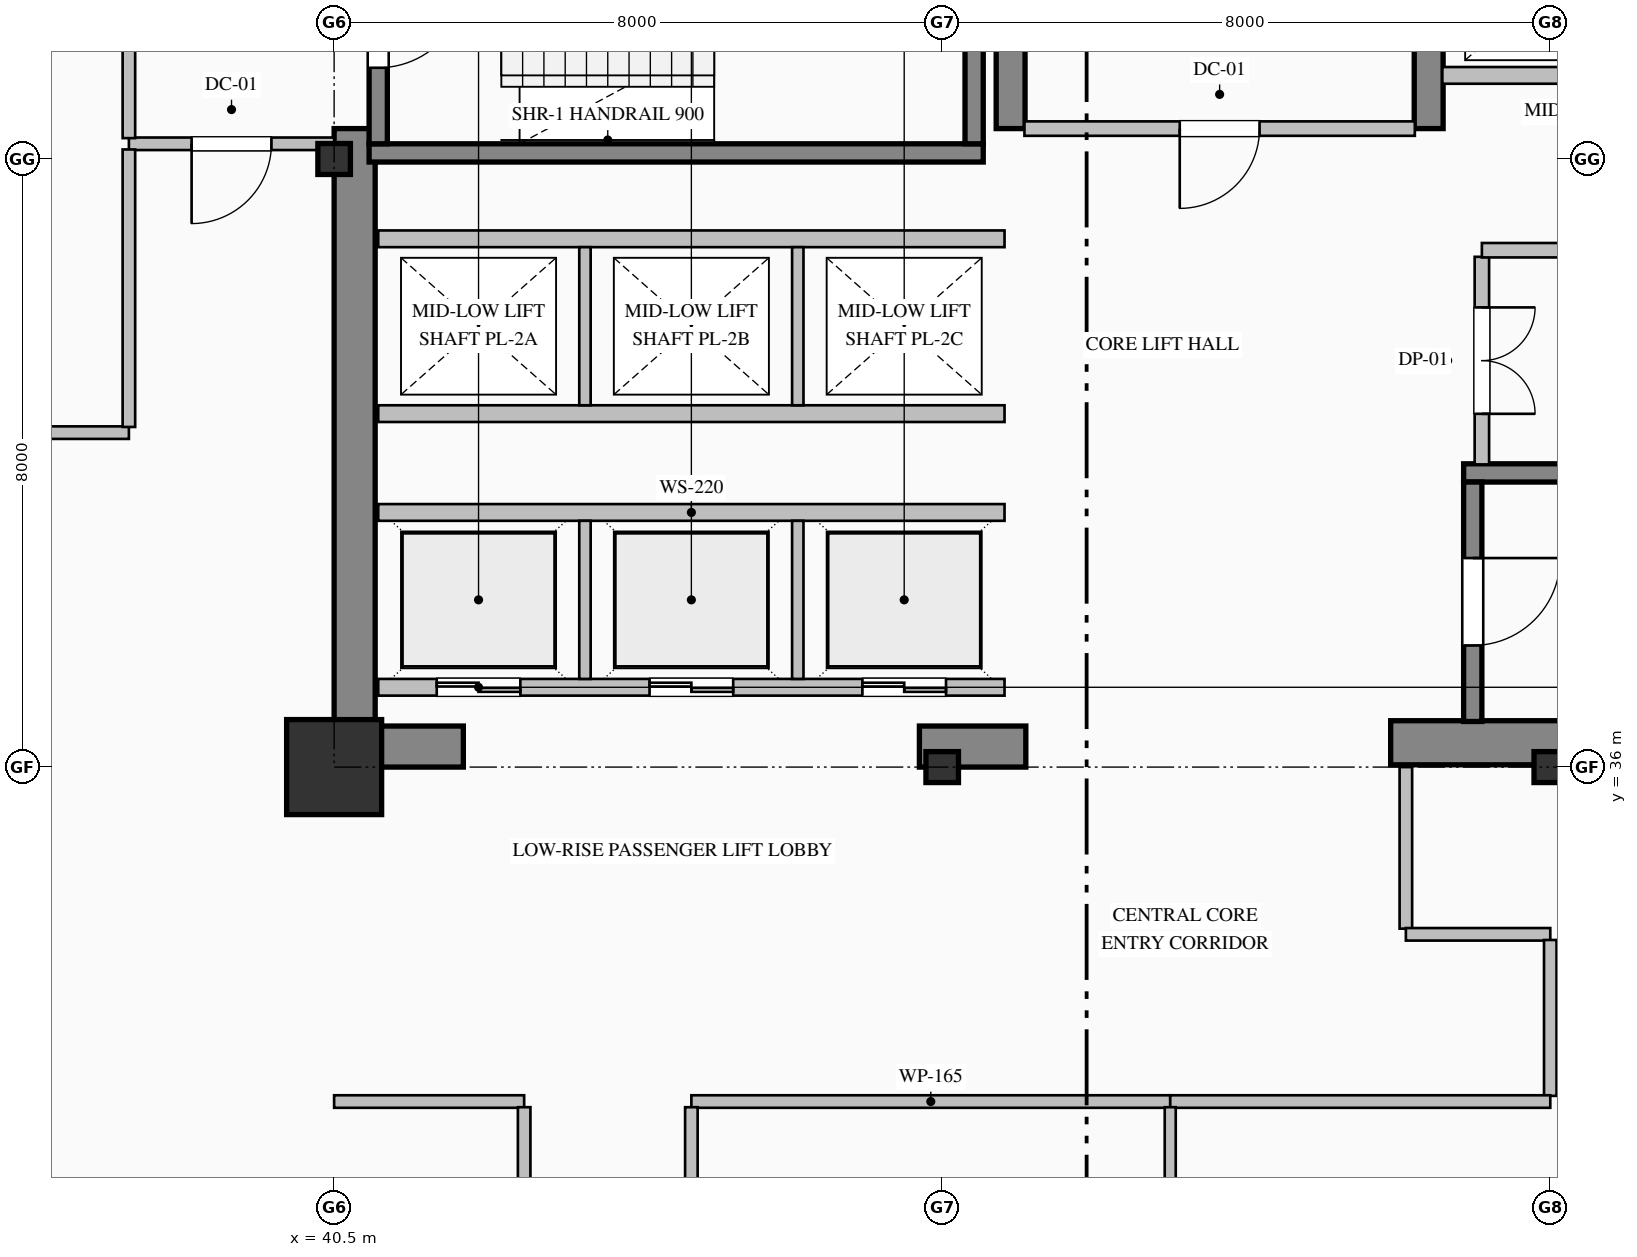
"""IFC4 building model, lengths in metres.
Left out: names, types, materials, properties, quantities, classifications, styles, units other than length and angle.
Written with IfcOpenShell. Run it as: python <this file> out.ifc"""

import sys

from ifc_helpers import new_model, si_unit, direction, frame, frame_2d, origin, origin_2d, place, context, subcontext, project, spatial, rectangle, hollow_rectangle, i_section, extrude, element, fill, save


model = new_model("IFC4")
c1 = context("Model", 3, precision=1e-05, world=origin(), true_north=direction((0.0, 1.0)))
c2 = subcontext(c1, "Body", "Model", "MODEL_VIEW")
j1 = project(units=[si_unit("LENGTHUNIT", "METRE"), si_unit("PLANEANGLEUNIT", "RADIAN")], contexts=[c1])
p1 = place(None, origin())
s1 = spatial("IfcSite", under=j1, at=p1, CompositionType="ELEMENT")
p2 = place(p1, origin())
s2 = spatial("IfcBuilding", under=s1, at=p2, CompositionType="ELEMENT")
p3 = place(p2, frame((0.0, 0.0, 76.2)))
s3 = spatial("IfcBuildingStorey", under=s2, at=p3, CompositionType="ELEMENT", Elevation=76.2)
p4 = place(p3, frame((40.77, 36.54, 0.0), z_axis=(0.0, 0.0, 1.0), x_axis=(0.0, 1.0, 0.0)))
e1 = element("IfcWall", 1, at=p4, inside=s3, PredefinedType="SHEAR", context=c2, shape_type="SweptSolid", body=[
    extrude(rectangle(XDim=7.86, YDim=0.54, at=frame_2d((3.93, 0.0))), origin(), (0.0, 0.0, 1.0), 3.75),
])
p5 = place(p3, frame((40.5, 36.27, 0.0), z_axis=(0.0, 0.0, 1.0), x_axis=(1.0, 0.0, 0.0)))
e2 = element("IfcWall", 2, at=p5, inside=s3, PredefinedType="SHEAR", context=c2, shape_type="SweptSolid", body=[
    extrude(rectangle(XDim=1.7, YDim=0.54, at=frame_2d((0.85, 0.0))), origin(), (0.0, 0.0, 1.0), 3.75),
])
p6 = place(p3, frame((48.2, 36.27, 0.0), z_axis=(0.0, 0.0, 1.0), x_axis=(1.0, 0.0, 0.0)))
e3 = element("IfcWall", 3, at=p6, inside=s3, PredefinedType="SHEAR", context=c2, shape_type="SweptSolid", body=[
    extrude(rectangle(XDim=1.4, YDim=0.54, at=frame_2d((0.7, 0.0))), origin(), (0.0, 0.0, 1.0), 3.75),
])
p7 = place(p3, frame((54.4, 36.32, 0.0), z_axis=(0.0, 0.0, 1.0), x_axis=(1.0, 0.0, 0.0)))
e4 = element("IfcWall", 4, at=p7, inside=s3, PredefinedType="SHEAR", context=c2, shape_type="SweptSolid", body=[
    extrude(rectangle(XDim=9.6, YDim=0.58, at=frame_2d((4.8, 0.0))), origin(), (0.0, 0.0, 1.0), 4.0),
])
p8 = place(p3, frame((49.4, 44.4, 0.0), z_axis=(0.0, 0.0, 1.0), x_axis=(0.0, 1.0, 0.0)))
e5 = element("IfcWall", 5, at=p8, inside=s3, PredefinedType="SHEAR", context=c2, shape_type="SweptSolid", body=[
    extrude(rectangle(XDim=3.0, YDim=0.38, at=frame_2d((1.5, 0.0))), origin(), (0.0, 0.0, 1.0), 3.75),
])
p9 = place(p3, frame((54.9, 44.4, 0.0), z_axis=(0.0, 0.0, 1.0), x_axis=(0.0, 1.0, 0.0)))
e6 = element("IfcWall", 6, at=p9, inside=s3, PredefinedType="SHEAR", context=c2, shape_type="SweptSolid", body=[
    extrude(rectangle(XDim=7.06, YDim=0.38, at=frame_2d((3.53, 0.0))), origin(), (0.0, 0.0, 1.0), 3.75),
])
p10 = place(p3, frame((40.5, 36.0, 0.0), z_axis=(0.0, 0.0, 1.0), x_axis=(1.0, 0.0, 0.0)))
e7 = element("IfcColumn", 7, at=p10, inside=s3, PredefinedType="COLUMN", context=c2, shape_type="SweptSolid", body=[
    extrude(hollow_rectangle(XDim=1.25, YDim=1.25, WallThickness=0.045, at=origin_2d()), origin(), (0.0, 0.0, 1.0), 4.0),
])
for number, where, z_axis, x_axis in (
    (8, (40.5, 44.0, 0.0), (0.0, 0.0, 1.0), (1.0, 0.0, 0.0)),
    (9, (48.5, 36.0, 0.0), (0.0, 0.0, 1.0), (1.0, 0.0, 0.0)),
    (10, (56.5, 36.0, 0.0), (0.0, 0.0, 1.0), (1.0, 0.0, 0.0)),
):
    element("IfcColumn", number, at=place(p3, frame(where, z_axis=z_axis, x_axis=x_axis)), inside=s3, PredefinedType="COLUMN", context=c2, shape_type="SweptSolid", body=[
        extrude(i_section(OverallWidth=0.407, OverallDepth=0.428, WebThickness=0.02, FlangeThickness=0.035, FilletRadius=0.022, at=origin_2d()), origin(), (0.0, 0.0, 1.0), 4.0),
    ])
p11 = place(p3, frame((49.04, 44.08, 0.0), z_axis=(0.0, 0.0, 1.0), x_axis=(-1.0, 0.0, 0.0)))
e11 = element("IfcWall", 11, at=p11, inside=s3, PredefinedType="SOLIDWALL", context=c2, shape_type="SweptSolid", body=[
    extrude(rectangle(XDim=8.08, YDim=0.24, at=frame_2d((4.04, 0.0))), origin(), (0.0, 0.0, 1.0), 4.0),
])
p12 = place(p3, frame((41.08, 47.35, 0.0), z_axis=(0.0, 0.0, 1.0), x_axis=(0.0, -1.0, 0.0)))
e12 = element("IfcWall", 12, at=p12, inside=s3, PredefinedType="SOLIDWALL", context=c2, shape_type="SweptSolid", body=[
    extrude(rectangle(XDim=3.15, YDim=0.24, at=frame_2d((1.575, 0.0))), origin(), (0.0, 0.0, 1.0), 4.0),
])
p13 = place(p12, frame((1.0, 0.0, 0.0)))
e13 = element("IfcOpeningElement", 13, at=p13, cuts=e12, PredefinedType="OPENING", context=c2, shape_type="SweptSolid", body=[
    extrude(rectangle(XDim=1.15, YDim=2.2, at=frame_2d((0.575, 1.1))), frame((0.0, 0.13, 0.0), z_axis=(0.0, -1.0, 0.0), x_axis=(1.0, 0.0, 0.0)), (0.0, 0.0, 1.0), 0.26),
])
p14 = place(p3, frame((48.92, 44.2, 0.0), z_axis=(0.0, 0.0, 1.0), x_axis=(0.0, 1.0, 0.0)))
e14 = element("IfcWall", 14, at=p14, inside=s3, PredefinedType="SOLIDWALL", context=c2, shape_type="SweptSolid", body=[
    extrude(rectangle(XDim=3.15, YDim=0.24, at=frame_2d((1.575, 0.0))), origin(), (0.0, 0.0, 1.0), 4.0),
])
p15 = place(p3, frame((55.36, 39.87, 0.0), z_axis=(0.0, 0.0, 1.0), x_axis=(1.0, 0.0, 0.0)))
e15 = element("IfcWall", 15, at=p15, inside=s3, PredefinedType="SOLIDWALL", context=c2, shape_type="SweptSolid", body=[
    extrude(rectangle(XDim=8.08, YDim=0.24, at=frame_2d((4.04, 0.0))), origin(), (0.0, 0.0, 1.0), 4.0),
])
p16 = place(p3, frame((55.48, 39.75, 0.0), z_axis=(0.0, 0.0, 1.0), x_axis=(0.0, -1.0, 0.0)))
e16 = element("IfcWall", 16, at=p16, inside=s3, PredefinedType="SOLIDWALL", context=c2, shape_type="SweptSolid", body=[
    extrude(rectangle(XDim=3.15, YDim=0.24, at=frame_2d((1.575, 0.0))), origin(), (0.0, 0.0, 1.0), 4.0),
])
p17 = place(p16, frame((1.0, 0.0, 0.0)))
e17 = element("IfcOpeningElement", 17, at=p17, cuts=e16, PredefinedType="OPENING", context=c2, shape_type="SweptSolid", body=[
    extrude(rectangle(XDim=1.15, YDim=2.2, at=frame_2d((0.575, 1.1))), frame((0.0, 0.13, 0.0), z_axis=(0.0, -1.0, 0.0), x_axis=(1.0, 0.0, 0.0)), (0.0, 0.0, 1.0), 0.26),
])
p18 = place(p3, frame((49.32, 37.05, 0.0), z_axis=(0.0, 0.0, 1.0), x_axis=(-1.0, 0.0, 0.0)))
e18 = element("IfcWall", 18, at=p18, inside=s3, PredefinedType="PARTITIONING", context=c2, shape_type="SweptSolid", body=[
    extrude(rectangle(XDim=8.24, YDim=0.22, at=frame_2d((4.12, 0.0))), origin(), (0.0, 0.0, 1.0), 3.75),
])
p19 = place(p18, frame((6.37, 0.0, 0.0)))
e19 = element("IfcOpeningElement", 19, at=p19, cuts=e18, PredefinedType="OPENING", context=c2, shape_type="SweptSolid", body=[
    extrude(rectangle(XDim=1.1, YDim=2.2, at=frame_2d((0.55, 1.1))), frame((0.0, 0.12, 0.0), z_axis=(0.0, -1.0, 0.0), x_axis=(1.0, 0.0, 0.0)), (0.0, 0.0, 1.0), 0.24),
])
p20 = place(p18, frame((3.57, 0.0, 0.0)))
e20 = element("IfcOpeningElement", 20, at=p20, cuts=e18, PredefinedType="OPENING", context=c2, shape_type="SweptSolid", body=[
    extrude(rectangle(XDim=1.1, YDim=2.2, at=frame_2d((0.55, 1.1))), frame((0.0, 0.12, 0.0), z_axis=(0.0, -1.0, 0.0), x_axis=(1.0, 0.0, 0.0)), (0.0, 0.0, 1.0), 0.24),
])
p21 = place(p18, frame((0.77, 0.0, 0.0)))
e21 = element("IfcOpeningElement", 21, at=p21, cuts=e18, PredefinedType="OPENING", context=c2, shape_type="SweptSolid", body=[
    extrude(rectangle(XDim=1.1, YDim=2.2, at=frame_2d((0.55, 1.1))), frame((0.0, 0.12, 0.0), z_axis=(0.0, -1.0, 0.0), x_axis=(1.0, 0.0, 0.0)), (0.0, 0.0, 1.0), 0.24),
])
p22 = place(p3, frame((41.08, 39.35, 0.0), z_axis=(0.0, 0.0, 1.0), x_axis=(1.0, 0.0, 0.0)))
e22 = element("IfcWall", 22, at=p22, inside=s3, PredefinedType="PARTITIONING", context=c2, shape_type="SweptSolid", body=[
    extrude(rectangle(XDim=8.24, YDim=0.22, at=frame_2d((4.12, 0.0))), origin(), (0.0, 0.0, 1.0), 3.75),
])
for number, where, z_axis, x_axis in (
    (23, (43.8, 37.16, 0.0), (0.0, 0.0, 1.0), (0.0, 1.0, 0.0)),
    (24, (46.6, 37.16, 0.0), (0.0, 0.0, 1.0), (0.0, 1.0, 0.0)),
):
    element("IfcWall", number, at=place(p3, frame(where, z_axis=z_axis, x_axis=x_axis)), inside=s3, PredefinedType="PARTITIONING", context=c2, shape_type="SweptSolid", body=[
        extrude(rectangle(XDim=2.08, YDim=0.15, at=frame_2d((1.04, 0.0))), origin(), (0.0, 0.0, 1.0), 3.75),
    ])
for number, where, z_axis, x_axis in (
    (25, (49.32, 40.65, 0.0), (0.0, 0.0, 1.0), (-1.0, 0.0, 0.0)),
    (26, (41.08, 42.95, 0.0), (0.0, 0.0, 1.0), (1.0, 0.0, 0.0)),
):
    element("IfcWall", number, at=place(p3, frame(where, z_axis=z_axis, x_axis=x_axis)), inside=s3, PredefinedType="PARTITIONING", context=c2, shape_type="SweptSolid", body=[
        extrude(rectangle(XDim=8.24, YDim=0.22, at=frame_2d((4.12, 0.0))), origin(), (0.0, 0.0, 1.0), 3.75),
    ])
for number, where, z_axis, x_axis in (
    (27, (43.8, 40.76, 0.0), (0.0, 0.0, 1.0), (0.0, 1.0, 0.0)),
    (28, (46.6, 40.76, 0.0), (0.0, 0.0, 1.0), (0.0, 1.0, 0.0)),
):
    element("IfcWall", number, at=place(p3, frame(where, z_axis=z_axis, x_axis=x_axis)), inside=s3, PredefinedType="PARTITIONING", context=c2, shape_type="SweptSolid", body=[
        extrude(rectangle(XDim=2.08, YDim=0.15, at=frame_2d((1.04, 0.0))), origin(), (0.0, 0.0, 1.0), 3.75),
    ])
p23 = place(p3, frame((63.32, 45.1, 0.0), z_axis=(0.0, 0.0, 1.0), x_axis=(-1.0, 0.0, 0.0)))
e29 = element("IfcWall", 29, at=p23, inside=s3, PredefinedType="PARTITIONING", context=c2, shape_type="SweptSolid", body=[
    extrude(rectangle(XDim=8.24, YDim=0.22, at=frame_2d((4.12, 0.0))), origin(), (0.0, 0.0, 1.0), 3.75),
])
p24 = place(p3, frame((40.5, 44.2, 0.0), z_axis=(0.0, 0.0, 1.0), x_axis=(-1.0, 0.0, 0.0)))
e30 = element("IfcWall", 30, at=p24, inside=s3, PredefinedType="PARTITIONING", context=c2, shape_type="SweptSolid", body=[
    extrude(rectangle(XDim=2.7, YDim=0.165, at=frame_2d((1.35, 0.0))), origin(), (0.0, 0.0, 1.0), 3.75),
])
p25 = place(p24, frame((0.825, 0.0, 0.0)))
e31 = element("IfcOpeningElement", 31, at=p25, cuts=e30, PredefinedType="OPENING", context=c2, shape_type="SweptSolid", body=[
    extrude(rectangle(XDim=1.05, YDim=2.15, at=frame_2d((0.525, 1.075))), frame((0.0, 0.093, 0.0), z_axis=(0.0, -1.0, 0.0), x_axis=(1.0, 0.0, 0.0)), (0.0, 0.0, 1.0), 0.185),
])
p26 = place(p3, frame((37.8, 44.274, 0.0), z_axis=(0.0, 0.0, 1.0), x_axis=(0.0, 1.0, 0.0)))
e32 = element("IfcWall", 32, at=p26, inside=s3, PredefinedType="PARTITIONING", context=c2, shape_type="SweptSolid", body=[
    extrude(rectangle(XDim=3.051, YDim=0.165, at=frame_2d((1.525, 0.0))), origin(), (0.0, 0.0, 1.0), 3.75),
])
p27 = place(p3, frame((54.718, 44.4, 0.0), z_axis=(0.0, 0.0, 1.0), x_axis=(-1.0, 0.0, 0.0)))
e33 = element("IfcWall", 33, at=p27, inside=s3, PredefinedType="PARTITIONING", context=c2, shape_type="SweptSolid", body=[
    extrude(rectangle(XDim=5.136, YDim=0.19, at=frame_2d((2.568, 0.0))), origin(), (0.0, 0.0, 1.0), 3.75),
])
p28 = place(p27, frame((2.043, 0.0, 0.0)))
e34 = element("IfcOpeningElement", 34, at=p28, cuts=e33, PredefinedType="OPENING", context=c2, shape_type="SweptSolid", body=[
    extrude(rectangle(XDim=1.05, YDim=2.15, at=frame_2d((0.525, 1.075))), frame((0.0, 0.105, 0.0), z_axis=(0.0, -1.0, 0.0), x_axis=(1.0, 0.0, 0.0)), (0.0, 0.0, 1.0), 0.21),
])
p29 = place(p3, frame((55.6, 42.713, 0.0), z_axis=(0.0, 0.0, 1.0), x_axis=(0.0, -1.0, 0.0)))
e35 = element("IfcWall", 35, at=p29, inside=s3, PredefinedType="PARTITIONING", context=c2, shape_type="SweptSolid", body=[
    extrude(rectangle(XDim=2.731, YDim=0.19, at=frame_2d((1.365, 0.0))), origin(), (0.0, 0.0, 1.0), 3.75),
])
p30 = place(p29, frame((0.666, 0.0, 0.0)))
e36 = element("IfcOpeningElement", 36, at=p30, cuts=e35, PredefinedType="OPENING", context=c2, shape_type="SweptSolid", body=[
    extrude(rectangle(XDim=1.4, YDim=2.25, at=frame_2d((0.7, 1.125))), frame((0.0, 0.105, 0.0), z_axis=(0.0, -1.0, 0.0), x_axis=(1.0, 0.0, 0.0)), (0.0, 0.0, 1.0), 0.21),
])
p31 = place(p3, frame((58.2, 42.8, 0.0), z_axis=(0.0, 0.0, 1.0), x_axis=(-1.0, 0.0, 0.0)))
e37 = element("IfcWall", 37, at=p31, inside=s3, PredefinedType="PARTITIONING", context=c2, shape_type="SweptSolid", body=[
    extrude(rectangle(XDim=2.6, YDim=0.19, at=frame_2d((1.3, 0.0))), origin(), (0.0, 0.0, 1.0), 3.75),
])
p32 = place(p3, frame((24.5, 40.4, 0.0), z_axis=(0.0, 0.0, 1.0), x_axis=(1.0, 0.0, 0.0)))
e38 = element("IfcWall", 38, at=p32, inside=s3, PredefinedType="PARTITIONING", context=c2, shape_type="SweptSolid", body=[
    extrude(rectangle(XDim=13.3, YDim=0.165, at=frame_2d((6.65, 0.0))), origin(), (0.0, 0.0, 1.0), 3.75),
])
p33 = place(p32, frame((6.15, 0.0, 0.0)))
e39 = element("IfcOpeningElement", 39, at=p33, cuts=e38, PredefinedType="OPENING", context=c2, shape_type="SweptSolid", body=[
    extrude(rectangle(XDim=1.0, YDim=2.15, at=frame_2d((0.5, 1.075))), frame((0.0, 0.093, 0.0), z_axis=(0.0, -1.0, 0.0), x_axis=(1.0, 0.0, 0.0)), (0.0, 0.0, 1.0), 0.185),
])
p34 = place(p3, frame((37.8, 40.475, 0.0), z_axis=(0.0, 0.0, 1.0), x_axis=(0.0, 1.0, 0.0)))
e40 = element("IfcWall", 40, at=p34, inside=s3, PredefinedType="PARTITIONING", context=c2, shape_type="SweptSolid", body=[
    extrude(rectangle(XDim=3.651, YDim=0.165, at=frame_2d((1.825, 0.0))), origin(), (0.0, 0.0, 1.0), 3.75),
])
p35 = place(p3, frame((51.5, 31.6, 0.0), z_axis=(0.0, 0.0, 1.0), x_axis=(-1.0, 0.0, 0.0)))
e41 = element("IfcWall", 41, at=p35, inside=s3, PredefinedType="PARTITIONING", context=c2, shape_type="SweptSolid", body=[
    extrude(rectangle(XDim=6.3, YDim=0.165, at=frame_2d((3.15, 0.0))), origin(), (0.0, 0.0, 1.0), 3.75),
])
p36 = place(p3, frame((54.6, 36.0, 0.0), z_axis=(0.0, 0.0, 1.0), x_axis=(0.0, -1.0, 0.0)))
e42 = element("IfcWall", 42, at=p36, inside=s3, PredefinedType="PARTITIONING", context=c2, shape_type="SweptSolid", body=[
    extrude(rectangle(XDim=2.125, YDim=0.165, at=frame_2d((1.063, 0.0))), origin(), (0.0, 0.0, 1.0), 3.75),
])
p37 = place(p3, frame((54.6, 33.8, 0.0), z_axis=(0.0, 0.0, 1.0), x_axis=(1.0, 0.0, 0.0)))
e43 = element("IfcWall", 43, at=p37, inside=s3, PredefinedType="PARTITIONING", context=c2, shape_type="SweptSolid", body=[
    extrude(rectangle(XDim=1.9, YDim=0.165, at=frame_2d((0.95, 0.0))), origin(), (0.0, 0.0, 1.0), 3.75),
])
p38 = place(p3, frame((56.5, 33.726, 0.0), z_axis=(0.0, 0.0, 1.0), x_axis=(0.0, -1.0, 0.0)))
e44 = element("IfcWall", 44, at=p38, inside=s3, PredefinedType="PARTITIONING", context=c2, shape_type="SweptSolid", body=[
    extrude(rectangle(XDim=2.051, YDim=0.165, at=frame_2d((1.025, 0.0))), origin(), (0.0, 0.0, 1.0), 3.042),
])
p39 = place(p3, frame((56.5, 31.6, 0.0), z_axis=(0.0, 0.0, 1.0), x_axis=(-1.0, 0.0, 0.0)))
e45 = element("IfcWall", 45, at=p39, inside=s3, PredefinedType="PARTITIONING", context=c2, shape_type="SweptSolid", body=[
    extrude(rectangle(XDim=5.0, YDim=0.165, at=frame_2d((2.5, 0.0))), origin(), (0.0, 0.0, 1.0), 3.75),
])
p40 = place(p3, frame((43.0, 31.6, 0.0), z_axis=(0.0, 0.0, 1.0), x_axis=(-1.0, 0.0, 0.0)))
e46 = element("IfcWall", 46, at=p40, inside=s3, PredefinedType="PARTITIONING", context=c2, shape_type="SweptSolid", body=[
    extrude(rectangle(XDim=2.5, YDim=0.165, at=frame_2d((1.25, 0.0))), origin(), (0.0, 0.0, 1.0), 3.75),
])
p41 = place(p3, frame((45.2, 31.525, 0.0), z_axis=(0.0, 0.0, 1.0), x_axis=(0.0, -1.0, 0.0)))
e47 = element("IfcWall", 47, at=p41, inside=s3, PredefinedType="PARTITIONING", context=c2, shape_type="SweptSolid", body=[
    extrude(rectangle(XDim=16.751, YDim=0.165, at=frame_2d((8.375, 0.0))), origin(), (0.0, 0.0, 1.0), 3.75),
])
p42 = place(p41, frame((7.875, 0.0, 0.0)))
e48 = element("IfcOpeningElement", 48, at=p42, cuts=e47, PredefinedType="OPENING", context=c2, shape_type="SweptSolid", body=[
    extrude(rectangle(XDim=1.0, YDim=2.15, at=frame_2d((0.5, 1.075))), frame((0.0, 0.093, 0.0), z_axis=(0.0, -1.0, 0.0), x_axis=(1.0, 0.0, 0.0)), (0.0, 0.0, 1.0), 0.185),
])
p43 = place(p3, frame((43.0, 22.057, 0.0), z_axis=(0.0, 0.0, 1.0), x_axis=(0.0, 1.0, 0.0)))
e49 = element("IfcWall", 49, at=p43, inside=s3, PredefinedType="PARTITIONING", context=c2, shape_type="SweptSolid", body=[
    extrude(rectangle(XDim=9.469, YDim=0.165, at=frame_2d((4.734, 0.0))), origin(), (0.0, 0.0, 1.0), 3.75),
])
p44 = place(p43, frame((4.234, 0.0, 0.0)))
e50 = element("IfcOpeningElement", 50, at=p44, cuts=e49, PredefinedType="OPENING", context=c2, shape_type="SweptSolid", body=[
    extrude(rectangle(XDim=1.0, YDim=2.15, at=frame_2d((0.5, 1.075))), frame((0.0, 0.093, 0.0), z_axis=(0.0, -1.0, 0.0), x_axis=(1.0, 0.0, 0.0)), (0.0, 0.0, 1.0), 0.185),
])
p45 = place(p3, frame((51.5, 31.525, 0.0), z_axis=(0.0, 0.0, 1.0), x_axis=(0.0, -1.0, 0.0)))
e51 = element("IfcWall", 51, at=p45, inside=s3, PredefinedType="PARTITIONING", context=c2, shape_type="SweptSolid", body=[
    extrude(rectangle(XDim=16.751, YDim=0.145, at=frame_2d((8.375, 0.0))), origin(), (0.0, 0.0, 1.0), 3.75),
])
p46 = place(p13, origin())
e52 = element("IfcDoor", 52, at=p46, inside=s3, OperationType="SINGLE_SWING_LEFT", PredefinedType="DOOR", context=c2, shape_type="SweptSolid", body=[
    extrude(rectangle(XDim=1.15, YDim=2.2, at=frame_2d((0.575, 1.1))), frame((0.0, 0.025, 0.0), z_axis=(0.0, -1.0, 0.0), x_axis=(1.0, 0.0, 0.0)), (0.0, 0.0, 1.0), 0.05),
])
fill(e13, e52)
p47 = place(p17, origin())
e53 = element("IfcDoor", 53, at=p47, inside=s3, OperationType="SINGLE_SWING_LEFT", PredefinedType="DOOR", context=c2, shape_type="SweptSolid", body=[
    extrude(rectangle(XDim=1.15, YDim=2.2, at=frame_2d((0.575, 1.1))), frame((0.0, 0.025, 0.0), z_axis=(0.0, -1.0, 0.0), x_axis=(1.0, 0.0, 0.0)), (0.0, 0.0, 1.0), 0.05),
])
fill(e17, e53)
p48 = place(p19, origin())
e54 = element("IfcDoor", 54, at=p48, inside=s3, OperationType="DOUBLE_DOOR_SLIDING", PredefinedType="DOOR", context=c2, shape_type="SweptSolid", body=[
    extrude(rectangle(XDim=1.1, YDim=2.2, at=frame_2d((0.55, 1.1))), frame((0.0, 0.025, 0.0), z_axis=(0.0, -1.0, 0.0), x_axis=(1.0, 0.0, 0.0)), (0.0, 0.0, 1.0), 0.05),
])
fill(e19, e54)
p49 = place(p20, origin())
e55 = element("IfcDoor", 55, at=p49, inside=s3, OperationType="DOUBLE_DOOR_SLIDING", PredefinedType="DOOR", context=c2, shape_type="SweptSolid", body=[
    extrude(rectangle(XDim=1.1, YDim=2.2, at=frame_2d((0.55, 1.1))), frame((0.0, 0.025, 0.0), z_axis=(0.0, -1.0, 0.0), x_axis=(1.0, 0.0, 0.0)), (0.0, 0.0, 1.0), 0.05),
])
fill(e20, e55)
p50 = place(p21, origin())
e56 = element("IfcDoor", 56, at=p50, inside=s3, OperationType="DOUBLE_DOOR_SLIDING", PredefinedType="DOOR", context=c2, shape_type="SweptSolid", body=[
    extrude(rectangle(XDim=1.1, YDim=2.2, at=frame_2d((0.55, 1.1))), frame((0.0, 0.025, 0.0), z_axis=(0.0, -1.0, 0.0), x_axis=(1.0, 0.0, 0.0)), (0.0, 0.0, 1.0), 0.05),
])
fill(e21, e56)
p51 = place(p28, origin())
e57 = element("IfcDoor", 57, at=p51, inside=s3, OperationType="SINGLE_SWING_RIGHT", PredefinedType="DOOR", context=c2, shape_type="SweptSolid", body=[
    extrude(rectangle(XDim=1.05, YDim=2.15, at=frame_2d((0.525, 1.075))), frame((0.0, 0.025, 0.0), z_axis=(0.0, -1.0, 0.0), x_axis=(1.0, 0.0, 0.0)), (0.0, 0.0, 1.0), 0.05),
])
fill(e34, e57)
p52 = place(p25, origin())
e58 = element("IfcDoor", 58, at=p52, inside=s3, OperationType="SINGLE_SWING_RIGHT", PredefinedType="DOOR", context=c2, shape_type="SweptSolid", body=[
    extrude(rectangle(XDim=1.05, YDim=2.15, at=frame_2d((0.525, 1.075))), frame((0.0, 0.025, 0.0), z_axis=(0.0, -1.0, 0.0), x_axis=(1.0, 0.0, 0.0)), (0.0, 0.0, 1.0), 0.05),
])
fill(e31, e58)
p53 = place(p30, origin())
e59 = element("IfcDoor", 59, at=p53, inside=s3, OperationType="DOUBLE_DOOR_SINGLE_SWING", PredefinedType="DOOR", context=c2, shape_type="SweptSolid", body=[
    extrude(rectangle(XDim=1.4, YDim=2.25, at=frame_2d((0.7, 1.125))), frame((0.0, 0.025, 0.0), z_axis=(0.0, -1.0, 0.0), x_axis=(1.0, 0.0, 0.0)), (0.0, 0.0, 1.0), 0.05),
])
fill(e36, e59)
save(model, sys.argv[1])
